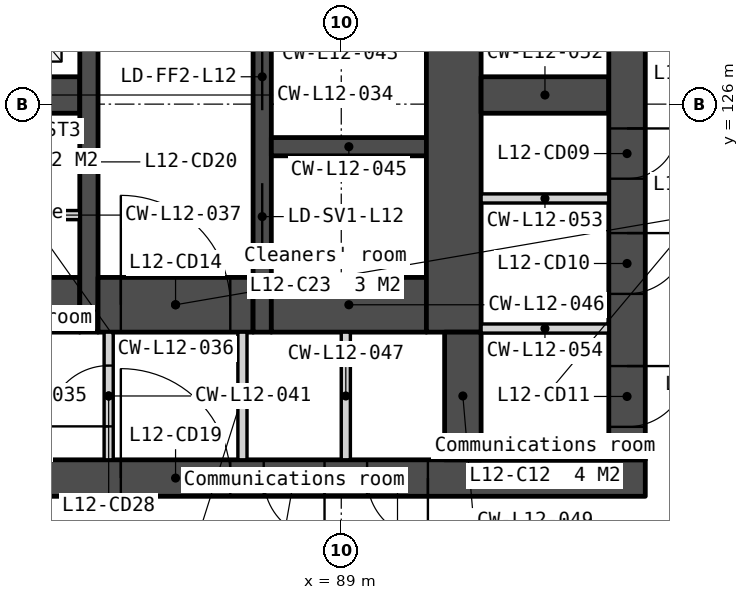
"""IFC4 building model, lengths in metres.
Left out: names, types, materials, properties, quantities, classifications, styles, units other than length and angle.
Written with IfcOpenShell. Run it as: python <this file> out.ifc"""

import sys

from ifc_helpers import new_model, si_unit, direction, frame, frame_2d, origin, place, context, subcontext, project, spatial, polyline, rectangle, outline, extrude, element, fill, save


model = new_model("IFC4")
c1 = context("Model", 3, precision=1e-05, world=origin(), true_north=direction((0.0, 1.0)))
c2 = subcontext(c1, "Body", "Model", "MODEL_VIEW")
j1 = project(units=[si_unit("LENGTHUNIT", "METRE"), si_unit("PLANEANGLEUNIT", "RADIAN")], contexts=[c1])
p1 = place(None, origin())
s1 = spatial("IfcSite", under=j1, at=p1, CompositionType="ELEMENT")
p2 = place(p1, origin())
s2 = spatial("IfcBuilding", under=s1, at=p2, CompositionType="ELEMENT")
p3 = place(p2, frame((0.0, 0.0, 56.0)))
s3 = spatial("IfcBuildingStorey", under=s2, at=p3, CompositionType="ELEMENT", Elevation=56.0)
p4 = place(p3, frame((66.0, 119.85, 0.0), z_axis=(0.0, 0.0, 1.0), x_axis=(1.0, 0.0, 0.0)))
e1 = element("IfcWall", 1, at=p4, inside=s3, PredefinedType="SOLIDWALL", context=c2, shape_type="SweptSolid", body=[
    extrude(rectangle(XDim=28.0, YDim=0.6, at=frame_2d((14.0, 0.0))), origin(), (0.0, 0.0, 1.0), 3.35),
])
p5 = place(p4, frame((6.825, 0.0, 0.0)))
e2 = element("IfcOpeningElement", 2, at=p5, cuts=e1, PredefinedType="OPENING", context=c2, shape_type="SweptSolid", body=[
    extrude(rectangle(XDim=1.8, YDim=2.1, at=frame_2d((0.9, 1.05))), frame((0.0, 0.31, 0.0), z_axis=(0.0, -1.0, 0.0), x_axis=(1.0, 0.0, 0.0)), (0.0, 0.0, 1.0), 0.62),
])
p6 = place(p4, frame((15.85, 0.0, 0.0)))
e3 = element("IfcOpeningElement", 3, at=p6, cuts=e1, PredefinedType="OPENING", context=c2, shape_type="SweptSolid", body=[
    extrude(rectangle(XDim=1.5, YDim=2.1, at=frame_2d((0.75, 1.05))), frame((0.0, 0.31, 0.0), z_axis=(0.0, -1.0, 0.0), x_axis=(1.0, 0.0, 0.0)), (0.0, 0.0, 1.0), 0.62),
])
p7 = place(p4, frame((19.375, 0.0, 0.0)))
e4 = element("IfcOpeningElement", 4, at=p7, cuts=e1, PredefinedType="OPENING", context=c2, shape_type="SweptSolid", body=[
    extrude(rectangle(XDim=1.8, YDim=2.1, at=frame_2d((0.9, 1.05))), frame((0.0, 0.31, 0.0), z_axis=(0.0, -1.0, 0.0), x_axis=(1.0, 0.0, 0.0)), (0.0, 0.0, 1.0), 0.62),
])
p8 = place(p4, frame((4.425, 0.0, 0.0)))
e5 = element("IfcOpeningElement", 5, at=p8, cuts=e1, PredefinedType="OPENING", context=c2, shape_type="SweptSolid", body=[
    extrude(rectangle(XDim=1.0, YDim=2.1, at=frame_2d((0.5, 1.05))), frame((0.0, 0.31, 0.0), z_axis=(0.0, -1.0, 0.0), x_axis=(1.0, 0.0, 0.0)), (0.0, 0.0, 1.0), 0.62),
])
p9 = place(p4, frame((9.783, 0.0, 0.0)))
e6 = element("IfcOpeningElement", 6, at=p9, cuts=e1, PredefinedType="OPENING", context=c2, shape_type="SweptSolid", body=[
    extrude(rectangle(XDim=1.0, YDim=2.1, at=frame_2d((0.5, 1.05))), frame((0.0, 0.31, 0.0), z_axis=(0.0, -1.0, 0.0), x_axis=(1.0, 0.0, 0.0)), (0.0, 0.0, 1.0), 0.62),
])
p10 = place(p4, frame((11.525, 0.0, 0.0)))
e7 = element("IfcOpeningElement", 7, at=p10, cuts=e1, PredefinedType="OPENING", context=c2, shape_type="SweptSolid", body=[
    extrude(rectangle(XDim=1.0, YDim=2.1, at=frame_2d((0.5, 1.05))), frame((0.0, 0.31, 0.0), z_axis=(0.0, -1.0, 0.0), x_axis=(1.0, 0.0, 0.0)), (0.0, 0.0, 1.0), 0.62),
])
p11 = place(p4, frame((13.658, 0.0, 0.0)))
e8 = element("IfcOpeningElement", 8, at=p11, cuts=e1, PredefinedType="OPENING", context=c2, shape_type="SweptSolid", body=[
    extrude(rectangle(XDim=1.0, YDim=2.1, at=frame_2d((0.5, 1.05))), frame((0.0, 0.31, 0.0), z_axis=(0.0, -1.0, 0.0), x_axis=(1.0, 0.0, 0.0)), (0.0, 0.0, 1.0), 0.62),
])
p12 = place(p4, frame((21.725, 0.0, 0.0)))
e9 = element("IfcOpeningElement", 9, at=p12, cuts=e1, PredefinedType="OPENING", context=c2, shape_type="SweptSolid", body=[
    extrude(rectangle(XDim=1.0, YDim=2.1, at=frame_2d((0.5, 1.05))), frame((0.0, 0.31, 0.0), z_axis=(0.0, -1.0, 0.0), x_axis=(1.0, 0.0, 0.0)), (0.0, 0.0, 1.0), 0.62),
])
p13 = place(p4, frame((23.425, 0.0, 0.0)))
e10 = element("IfcOpeningElement", 10, at=p13, cuts=e1, PredefinedType="OPENING", context=c2, shape_type="SweptSolid", body=[
    extrude(rectangle(XDim=1.0, YDim=2.1, at=frame_2d((0.5, 1.05))), frame((0.0, 0.31, 0.0), z_axis=(0.0, -1.0, 0.0), x_axis=(1.0, 0.0, 0.0)), (0.0, 0.0, 1.0), 0.62),
])
p14 = place(p3, frame((81.8, 122.7, 0.0), z_axis=(0.0, 0.0, 1.0), x_axis=(1.0, 0.0, 0.0)))
e11 = element("IfcWall", 11, at=p14, inside=s3, PredefinedType="SOLIDWALL", context=c2, shape_type="SweptSolid", body=[
    extrude(rectangle(XDim=2.9, YDim=0.9, at=frame_2d((1.45, 0.0))), origin(), (0.0, 0.0, 1.0), 3.35),
])
p15 = place(p14, frame((0.05, 0.0, 0.0)))
e12 = element("IfcOpeningElement", 12, at=p15, cuts=e11, PredefinedType="OPENING", context=c2, shape_type="SweptSolid", body=[
    extrude(rectangle(XDim=1.5, YDim=2.1, at=frame_2d((0.75, 1.05))), frame((0.0, 0.46, 0.0), z_axis=(0.0, -1.0, 0.0), x_axis=(1.0, 0.0, 0.0)), (0.0, 0.0, 1.0), 0.92),
])
p16 = place(p3, frame((82.6, 126.15, 0.0), z_axis=(0.0, 0.0, 1.0), x_axis=(1.0, 0.0, 0.0)))
e13 = element("IfcWall", 13, at=p16, inside=s3, PredefinedType="SOLIDWALL", context=c2, shape_type="SweptSolid", body=[
    extrude(rectangle(XDim=2.1, YDim=0.6, at=frame_2d((1.05, 0.0))), origin(), (0.0, 0.0, 1.0), 3.35),
])
p17 = place(p3, frame((83.35, 124.175, 0.0), z_axis=(0.0, 0.0, 1.0), x_axis=(1.0, 0.0, 0.0)))
e14 = element("IfcWall", 14, at=p17, inside=s3, PredefinedType="PARTITIONING", context=c2, shape_type="SweptSolid", body=[
    extrude(rectangle(XDim=1.35, YDim=0.15, at=frame_2d((0.675, 0.0))), origin(), (0.0, 0.0, 1.0), 3.35),
])
p18 = place(p3, frame((84.85, 133.95, 0.0), z_axis=(0.0, 0.0, 1.0), x_axis=(0.0, -1.0, 0.0)))
e15 = element("IfcWall", 15, at=p18, inside=s3, PredefinedType="SOLIDWALL", context=c2, shape_type="SweptSolid", body=[
    extrude(rectangle(XDim=11.7, YDim=0.3, at=frame_2d((5.85, 0.0))), origin(), (0.0, 0.0, 1.0), 3.35),
])
p19 = place(p3, frame((85.0, 122.7, 0.0), z_axis=(0.0, 0.0, 1.0), x_axis=(1.0, 0.0, 0.0)))
e16 = element("IfcWall", 16, at=p19, inside=s3, PredefinedType="SOLIDWALL", context=c2, shape_type="SweptSolid", body=[
    extrude(rectangle(XDim=2.55, YDim=0.9, at=frame_2d((1.275, 0.0))), origin(), (0.0, 0.0, 1.0), 3.35),
])
p20 = place(p19, frame((0.375, 0.0, 0.0)))
e17 = element("IfcOpeningElement", 17, at=p20, cuts=e16, PredefinedType="OPENING", context=c2, shape_type="SweptSolid", body=[
    extrude(rectangle(XDim=1.8, YDim=2.1, at=frame_2d((0.9, 1.05))), frame((0.0, 0.46, 0.0), z_axis=(0.0, -1.0, 0.0), x_axis=(1.0, 0.0, 0.0)), (0.0, 0.0, 1.0), 0.92),
])
p21 = place(p3, frame((85.175, 122.25, 0.0), z_axis=(0.0, 0.0, 1.0), x_axis=(0.0, -1.0, 0.0)))
e18 = element("IfcWall", 18, at=p21, inside=s3, PredefinedType="PARTITIONING", context=c2, shape_type="SweptSolid", body=[
    extrude(rectangle(XDim=2.1, YDim=0.15, at=frame_2d((1.05, 0.0))), origin(), (0.0, 0.0, 1.0), 3.35),
])
p22 = place(p21, frame((0.55, 0.0, 0.0)))
e19 = element("IfcOpeningElement", 19, at=p22, cuts=e18, PredefinedType="OPENING", context=c2, shape_type="SweptSolid", body=[
    extrude(rectangle(XDim=1.0, YDim=2.1, at=frame_2d((0.5, 1.05))), frame((0.0, 0.085, 0.0), z_axis=(0.0, -1.0, 0.0), x_axis=(1.0, 0.0, 0.0)), (0.0, 0.0, 1.0), 0.17),
])
p23 = place(p3, frame((87.375, 122.25, 0.0), z_axis=(0.0, 0.0, 1.0), x_axis=(0.0, -1.0, 0.0)))
e20 = element("IfcWall", 20, at=p23, inside=s3, PredefinedType="PARTITIONING", context=c2, shape_type="SweptSolid", body=[
    extrude(rectangle(XDim=2.1, YDim=0.15, at=frame_2d((1.05, 0.0))), origin(), (0.0, 0.0, 1.0), 3.35),
])
p24 = place(p3, frame((87.7, 133.95, 0.0), z_axis=(0.0, 0.0, 1.0), x_axis=(0.0, -1.0, 0.0)))
e21 = element("IfcWall", 21, at=p24, inside=s3, PredefinedType="SOLIDWALL", context=c2, shape_type="SweptSolid", body=[
    extrude(rectangle(XDim=11.7, YDim=0.3, at=frame_2d((5.85, 0.0))), origin(), (0.0, 0.0, 1.0), 3.35),
])
p25 = place(p24, frame((6.95, 0.0, 0.0)))
e22 = element("IfcOpeningElement", 22, at=p25, cuts=e21, PredefinedType="OPENING", context=c2, shape_type="SweptSolid", body=[
    extrude(rectangle(XDim=1.1, YDim=2.1, at=frame_2d((0.55, 1.05))), frame((0.0, 0.16, 0.0), z_axis=(0.0, -1.0, 0.0), x_axis=(1.0, 0.0, 0.0)), (0.0, 0.0, 1.0), 0.32),
])
p26 = place(p24, frame((5.1, 0.0, 0.0)))
e23 = element("IfcOpeningElement", 23, at=p26, cuts=e21, PredefinedType="OPENING", context=c2, shape_type="SweptSolid", body=[
    extrude(rectangle(XDim=1.0, YDim=2.1, at=frame_2d((0.5, 1.05))), frame((0.0, 0.16, 0.0), z_axis=(0.0, -1.0, 0.0), x_axis=(1.0, 0.0, 0.0)), (0.0, 0.0, 1.0), 0.32),
])
p27 = place(p24, frame((9.25, 0.0, 0.0)))
e24 = element("IfcOpeningElement", 24, at=p27, cuts=e21, PredefinedType="OPENING", context=c2, shape_type="SweptSolid", body=[
    extrude(rectangle(XDim=1.1, YDim=2.1, at=frame_2d((0.55, 1.05))), frame((0.0, 0.16, 0.0), z_axis=(0.0, -1.0, 0.0), x_axis=(1.0, 0.0, 0.0)), (0.0, 0.0, 1.0), 0.32),
])
p28 = place(p3, frame((87.85, 125.3, 0.0), z_axis=(0.0, 0.0, 1.0), x_axis=(1.0, 0.0, 0.0)))
e25 = element("IfcWall", 25, at=p28, inside=s3, PredefinedType="SOLIDWALL", context=c2, shape_type="SweptSolid", body=[
    extrude(rectangle(XDim=2.55, YDim=0.3, at=frame_2d((1.275, 0.0))), origin(), (0.0, 0.0, 1.0), 3.35),
])
p29 = place(p3, frame((87.85, 122.7, 0.0), z_axis=(0.0, 0.0, 1.0), x_axis=(1.0, 0.0, 0.0)))
e26 = element("IfcWall", 26, at=p29, inside=s3, PredefinedType="SOLIDWALL", context=c2, shape_type="SweptSolid", body=[
    extrude(rectangle(XDim=2.55, YDim=0.9, at=frame_2d((1.275, 0.0))), origin(), (0.0, 0.0, 1.0), 3.35),
])
p30 = place(p3, frame((89.075, 122.25, 0.0), z_axis=(0.0, 0.0, 1.0), x_axis=(0.0, -1.0, 0.0)))
e27 = element("IfcWall", 27, at=p30, inside=s3, PredefinedType="PARTITIONING", context=c2, shape_type="SweptSolid", body=[
    extrude(rectangle(XDim=2.1, YDim=0.15, at=frame_2d((1.05, 0.0))), origin(), (0.0, 0.0, 1.0), 3.35),
])
p31 = place(p3, frame((90.85, 133.95, 0.0), z_axis=(0.0, 0.0, 1.0), x_axis=(0.0, -1.0, 0.0)))
e28 = element("IfcWall", 28, at=p31, inside=s3, PredefinedType="SOLIDWALL", context=c2, shape_type="SweptSolid", body=[
    extrude(rectangle(XDim=11.7, YDim=0.9, at=frame_2d((5.85, 0.0))), origin(), (0.0, 0.0, 1.0), 3.35),
])
p32 = place(p3, frame((91.0, 122.25, 0.0), z_axis=(0.0, 0.0, 1.0), x_axis=(0.0, -1.0, 0.0)))
e29 = element("IfcWall", 29, at=p32, inside=s3, PredefinedType="SOLIDWALL", context=c2, shape_type="SweptSolid", body=[
    extrude(rectangle(XDim=2.1, YDim=0.6, at=frame_2d((1.05, 0.0))), origin(), (0.0, 0.0, 1.0), 3.35),
])
p33 = place(p3, frame((91.3, 126.15, 0.0), z_axis=(0.0, 0.0, 1.0), x_axis=(1.0, 0.0, 0.0)))
e30 = element("IfcWall", 30, at=p33, inside=s3, PredefinedType="SOLIDWALL", context=c2, shape_type="SweptSolid", body=[
    extrude(rectangle(XDim=2.1, YDim=0.6, at=frame_2d((1.05, 0.0))), origin(), (0.0, 0.0, 1.0), 3.35),
])
for number, where, z_axis, x_axis in (
    (31, (91.3, 124.449, 0.0), (0.0, 0.0, 1.0), (1.0, 0.0, 0.0)),
    (32, (91.3, 122.309, 0.0), (0.0, 0.0, 1.0), (1.0, 0.0, 0.0)),
):
    element("IfcWall", number, at=place(p3, frame(where, z_axis=z_axis, x_axis=x_axis)), inside=s3, PredefinedType="PARTITIONING", context=c2, shape_type="SweptSolid", body=[
        extrude(rectangle(XDim=2.1, YDim=0.15, at=frame_2d((1.05, 0.0))), origin(), (0.0, 0.0, 1.0), 3.35),
    ])
p34 = place(p3, frame((93.7, 133.95, 0.0), z_axis=(0.0, 0.0, 1.0), x_axis=(0.0, -1.0, 0.0)))
e33 = element("IfcWall", 33, at=p34, inside=s3, PredefinedType="SOLIDWALL", context=c2, shape_type="SweptSolid", body=[
    extrude(rectangle(XDim=13.8, YDim=0.6, at=frame_2d((6.9, 0.0))), origin(), (0.0, 0.0, 1.0), 3.35),
])
p35 = place(p34, frame((0.6, 0.0, 0.0)))
e34 = element("IfcOpeningElement", 34, at=p35, cuts=e33, PredefinedType="OPENING", context=c2, shape_type="SweptSolid", body=[
    extrude(rectangle(XDim=1.1, YDim=2.1, at=frame_2d((0.55, 1.05))), frame((0.0, 0.31, 0.0), z_axis=(0.0, -1.0, 0.0), x_axis=(1.0, 0.0, 0.0)), (0.0, 0.0, 1.0), 0.62),
])
p36 = place(p34, frame((8.35, 0.0, 0.0)))
e35 = element("IfcOpeningElement", 35, at=p36, cuts=e33, PredefinedType="OPENING", context=c2, shape_type="SweptSolid", body=[
    extrude(rectangle(XDim=0.826, YDim=2.1, at=frame_2d((0.413, 1.05))), frame((0.0, 0.31, 0.0), z_axis=(0.0, -1.0, 0.0), x_axis=(1.0, 0.0, 0.0)), (0.0, 0.0, 1.0), 0.62),
])
p37 = place(p34, frame((10.071, 0.0, 0.0)))
e36 = element("IfcOpeningElement", 36, at=p37, cuts=e33, PredefinedType="OPENING", context=c2, shape_type="SweptSolid", body=[
    extrude(rectangle(XDim=1.0, YDim=2.1, at=frame_2d((0.5, 1.05))), frame((0.0, 0.31, 0.0), z_axis=(0.0, -1.0, 0.0), x_axis=(1.0, 0.0, 0.0)), (0.0, 0.0, 1.0), 0.62),
])
p38 = place(p34, frame((12.258, 0.0, 0.0)))
e37 = element("IfcOpeningElement", 37, at=p38, cuts=e33, PredefinedType="OPENING", context=c2, shape_type="SweptSolid", body=[
    extrude(rectangle(XDim=1.0, YDim=2.1, at=frame_2d((0.5, 1.05))), frame((0.0, 0.31, 0.0), z_axis=(0.0, -1.0, 0.0), x_axis=(1.0, 0.0, 0.0)), (0.0, 0.0, 1.0), 0.62),
])
p39 = place(p3, frame((83.105, 90.599, -0.15), z_axis=(0.0, 0.0, 1.0), x_axis=(0.499999201451, 0.866025864826, 0.0)))
e38 = element("IfcWall", 38, at=p39, inside=s3, PredefinedType="SOLIDWALL", context=c2, shape_type="SweptSolid", body=[
    extrude(outline(polyline([(44.8, 0.0), (44.8, 3.5), (0.0, 3.5), (0.0, 0.0), (44.8, 0.0)])), frame((0.0, 0.225, 0.0), z_axis=(0.0, -1.0, 0.0), x_axis=(1.0, 0.0, 0.0)), (0.0, 0.0, 1.0), 0.45),
])
p40 = place(p39, frame((0.786, 0.0, 1.05)))
e39 = element("IfcOpeningElement", 39, at=p40, cuts=e38, PredefinedType="OPENING", context=c2, shape_type="SweptSolid", body=[
    extrude(rectangle(XDim=1.2, YDim=1.5, at=frame_2d((0.6, 0.75))), frame((0.0, 0.235, 0.0), z_axis=(0.0, -1.0, 0.0), x_axis=(1.0, 0.0, 0.0)), (0.0, 0.0, 1.0), 0.47),
])
p41 = place(p39, frame((6.91, 0.0, 1.05)))
e40 = element("IfcOpeningElement", 40, at=p41, cuts=e38, PredefinedType="OPENING", context=c2, shape_type="SweptSolid", body=[
    extrude(rectangle(XDim=1.8, YDim=1.5, at=frame_2d((0.9, 0.75))), frame((0.0, 0.235, 0.0), z_axis=(0.0, -1.0, 0.0), x_axis=(1.0, 0.0, 0.0)), (0.0, 0.0, 1.0), 0.47),
])
p42 = place(p39, frame((9.21, 0.0, 1.05)))
e41 = element("IfcOpeningElement", 41, at=p42, cuts=e38, PredefinedType="OPENING", context=c2, shape_type="SweptSolid", body=[
    extrude(rectangle(XDim=1.8, YDim=1.5, at=frame_2d((0.9, 0.75))), frame((0.0, 0.235, 0.0), z_axis=(0.0, -1.0, 0.0), x_axis=(1.0, 0.0, 0.0)), (0.0, 0.0, 1.0), 0.47),
])
p43 = place(p39, frame((15.87, 0.0, 1.05)))
e42 = element("IfcOpeningElement", 42, at=p43, cuts=e38, PredefinedType="OPENING", context=c2, shape_type="SweptSolid", body=[
    extrude(rectangle(XDim=1.8, YDim=1.5, at=frame_2d((0.9, 0.75))), frame((0.0, 0.235, 0.0), z_axis=(0.0, -1.0, 0.0), x_axis=(1.0, 0.0, 0.0)), (0.0, 0.0, 1.0), 0.47),
])
p44 = place(p39, frame((18.17, 0.0, 1.05)))
e43 = element("IfcOpeningElement", 43, at=p44, cuts=e38, PredefinedType="OPENING", context=c2, shape_type="SweptSolid", body=[
    extrude(rectangle(XDim=1.8, YDim=1.5, at=frame_2d((0.9, 0.75))), frame((0.0, 0.235, 0.0), z_axis=(0.0, -1.0, 0.0), x_axis=(1.0, 0.0, 0.0)), (0.0, 0.0, 1.0), 0.47),
])
p45 = place(p39, frame((24.83, 0.0, 1.05)))
e44 = element("IfcOpeningElement", 44, at=p45, cuts=e38, PredefinedType="OPENING", context=c2, shape_type="SweptSolid", body=[
    extrude(rectangle(XDim=1.8, YDim=1.5, at=frame_2d((0.9, 0.75))), frame((0.0, 0.235, 0.0), z_axis=(0.0, -1.0, 0.0), x_axis=(1.0, 0.0, 0.0)), (0.0, 0.0, 1.0), 0.47),
])
p46 = place(p39, frame((27.13, 0.0, 1.05)))
e45 = element("IfcOpeningElement", 45, at=p46, cuts=e38, PredefinedType="OPENING", context=c2, shape_type="SweptSolid", body=[
    extrude(rectangle(XDim=1.8, YDim=1.5, at=frame_2d((0.9, 0.75))), frame((0.0, 0.235, 0.0), z_axis=(0.0, -1.0, 0.0), x_axis=(1.0, 0.0, 0.0)), (0.0, 0.0, 1.0), 0.47),
])
p47 = place(p39, frame((33.79, 0.0, 1.05)))
e46 = element("IfcOpeningElement", 46, at=p47, cuts=e38, PredefinedType="OPENING", context=c2, shape_type="SweptSolid", body=[
    extrude(rectangle(XDim=1.8, YDim=1.5, at=frame_2d((0.9, 0.75))), frame((0.0, 0.235, 0.0), z_axis=(0.0, -1.0, 0.0), x_axis=(1.0, 0.0, 0.0)), (0.0, 0.0, 1.0), 0.47),
])
p48 = place(p39, frame((36.09, 0.0, 1.05)))
e47 = element("IfcOpeningElement", 47, at=p48, cuts=e38, PredefinedType="OPENING", context=c2, shape_type="SweptSolid", body=[
    extrude(rectangle(XDim=1.8, YDim=1.5, at=frame_2d((0.9, 0.75))), frame((0.0, 0.235, 0.0), z_axis=(0.0, -1.0, 0.0), x_axis=(1.0, 0.0, 0.0)), (0.0, 0.0, 1.0), 0.47),
])
p49 = place(p39, frame((42.814, 0.0, 1.05)))
e48 = element("IfcOpeningElement", 48, at=p49, cuts=e38, PredefinedType="OPENING", context=c2, shape_type="SweptSolid", body=[
    extrude(rectangle(XDim=1.2, YDim=1.5, at=frame_2d((0.6, 0.75))), frame((0.0, 0.235, 0.0), z_axis=(0.0, -1.0, 0.0), x_axis=(1.0, 0.0, 0.0)), (0.0, 0.0, 1.0), 0.47),
])
p50 = place(p36, origin())
e49 = element("IfcDoor", 49, at=p50, inside=s3, OperationType="SINGLE_SWING_LEFT", PredefinedType="DOOR", context=c2, shape_type="SweptSolid", body=[
    extrude(rectangle(XDim=0.826, YDim=2.1, at=frame_2d((0.413, 1.05))), frame((0.0, 0.025, 0.0), z_axis=(0.0, -1.0, 0.0), x_axis=(1.0, 0.0, 0.0)), (0.0, 0.0, 1.0), 0.05),
])
fill(e35, e49)
p51 = place(p37, origin())
e50 = element("IfcDoor", 50, at=p51, inside=s3, OperationType="SINGLE_SWING_LEFT", PredefinedType="DOOR", context=c2, shape_type="SweptSolid", body=[
    extrude(rectangle(XDim=1.0, YDim=2.1, at=frame_2d((0.5, 1.05))), frame((0.0, 0.025, 0.0), z_axis=(0.0, -1.0, 0.0), x_axis=(1.0, 0.0, 0.0)), (0.0, 0.0, 1.0), 0.05),
])
fill(e36, e50)
p52 = place(p38, origin())
e51 = element("IfcDoor", 51, at=p52, inside=s3, OperationType="SINGLE_SWING_LEFT", PredefinedType="DOOR", context=c2, shape_type="SweptSolid", body=[
    extrude(rectangle(XDim=1.0, YDim=2.1, at=frame_2d((0.5, 1.05))), frame((0.0, 0.025, 0.0), z_axis=(0.0, -1.0, 0.0), x_axis=(1.0, 0.0, 0.0)), (0.0, 0.0, 1.0), 0.05),
])
fill(e37, e51)
p53 = place(p25, origin())
e52 = element("IfcDoor", 52, at=p53, inside=s3, OperationType="SLIDING_TO_LEFT", PredefinedType="DOOR", context=c2, shape_type="SweptSolid", body=[
    extrude(rectangle(XDim=1.1, YDim=2.1, at=frame_2d((0.55, 1.05))), frame((0.0, 0.025, 0.0), z_axis=(0.0, -1.0, 0.0), x_axis=(1.0, 0.0, 0.0)), (0.0, 0.0, 1.0), 0.05),
])
fill(e22, e52)
p54 = place(p20, origin())
e53 = element("IfcDoor", 53, at=p54, inside=s3, OperationType="DOUBLE_DOOR_DOUBLE_SWING", PredefinedType="DOOR", context=c2, shape_type="SweptSolid", body=[
    extrude(rectangle(XDim=1.8, YDim=2.1, at=frame_2d((0.9, 1.05))), frame((0.0, 0.025, 0.0), z_axis=(0.0, -1.0, 0.0), x_axis=(1.0, 0.0, 0.0)), (0.0, 0.0, 1.0), 0.05),
])
fill(e17, e53)
p55 = place(p7, origin())
e54 = element("IfcDoor", 54, at=p55, inside=s3, OperationType="DOUBLE_DOOR_DOUBLE_SWING", PredefinedType="DOOR", context=c2, shape_type="SweptSolid", body=[
    extrude(rectangle(XDim=1.8, YDim=2.1, at=frame_2d((0.9, 1.05))), frame((0.0, 0.025, 0.0), z_axis=(0.0, -1.0, 0.0), x_axis=(1.0, 0.0, 0.0)), (0.0, 0.0, 1.0), 0.05),
])
fill(e4, e54)
p56 = place(p22, origin())
e55 = element("IfcDoor", 55, at=p56, inside=s3, OperationType="SINGLE_SWING_RIGHT", PredefinedType="DOOR", context=c2, shape_type="SweptSolid", body=[
    extrude(rectangle(XDim=1.0, YDim=2.1, at=frame_2d((0.5, 1.05))), frame((0.0, 0.025, 0.0), z_axis=(0.0, -1.0, 0.0), x_axis=(1.0, 0.0, 0.0)), (0.0, 0.0, 1.0), 0.05),
])
fill(e19, e55)
p57 = place(p12, origin())
e56 = element("IfcDoor", 56, at=p57, inside=s3, OperationType="SINGLE_SWING_RIGHT", PredefinedType="DOOR", context=c2, shape_type="SweptSolid", body=[
    extrude(rectangle(XDim=1.0, YDim=2.1, at=frame_2d((0.5, 1.05))), frame((0.0, 0.025, 0.0), z_axis=(0.0, -1.0, 0.0), x_axis=(1.0, 0.0, 0.0)), (0.0, 0.0, 1.0), 0.05),
])
fill(e9, e56)
p58 = place(p13, origin())
e57 = element("IfcDoor", 57, at=p58, inside=s3, OperationType="SINGLE_SWING_RIGHT", PredefinedType="DOOR", context=c2, shape_type="SweptSolid", body=[
    extrude(rectangle(XDim=1.0, YDim=2.1, at=frame_2d((0.5, 1.05))), frame((0.0, 0.025, 0.0), z_axis=(0.0, -1.0, 0.0), x_axis=(1.0, 0.0, 0.0)), (0.0, 0.0, 1.0), 0.05),
])
fill(e10, e57)
p59 = place(p27, origin())
e58 = element("IfcDoor", 58, at=p59, inside=s3, OperationType="SLIDING_TO_LEFT", PredefinedType="DOOR", context=c2, shape_type="SweptSolid", body=[
    extrude(rectangle(XDim=1.1, YDim=2.1, at=frame_2d((0.55, 1.05))), frame((0.0, 0.025, 0.0), z_axis=(0.0, -1.0, 0.0), x_axis=(1.0, 0.0, 0.0)), (0.0, 0.0, 1.0), 0.05),
])
fill(e24, e58)
save(model, sys.argv[1])
